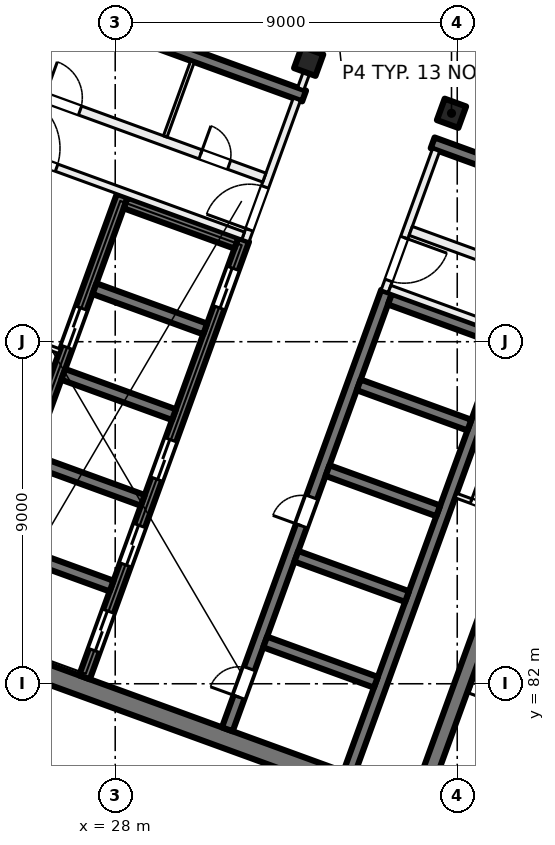
"""IFC4 building model, lengths in metres.
Left out: names, types, materials, properties, quantities, classifications, styles, units other than length and angle.
Written with IfcOpenShell. Run it as: python <this file> out.ifc"""

import sys

from ifc_helpers import new_model, si_unit, direction, frame, frame_2d, origin, origin_2d, place, context, subcontext, project, spatial, rectangle, extrude, element, fill, save


model = new_model("IFC4")
c1 = context("Model", 3, precision=1e-05, world=origin(), true_north=direction((0.0, 1.0)))
c2 = subcontext(c1, "Body", "Model", "MODEL_VIEW")
j1 = project(units=[si_unit("LENGTHUNIT", "METRE"), si_unit("PLANEANGLEUNIT", "RADIAN")], contexts=[c1])
p1 = place(None, origin())
s1 = spatial("IfcSite", under=j1, at=p1, CompositionType="ELEMENT")
p2 = place(p1, origin())
s2 = spatial("IfcBuilding", under=s1, at=p2, CompositionType="ELEMENT")
p3 = place(p2, frame((0.0, 0.0, 208.0)))
s3 = spatial("IfcBuildingStorey", under=s2, at=p3, CompositionType="ELEMENT", Elevation=208.0)
for number, where, z_axis, x_axis in (
    (1, (36.849, 97.011, 0.0), (0.0, 0.0, 1.0), (-0.342, -0.94, 0.0)),
    (2, (33.091, 98.379, 0.0), (0.0, 0.0, 1.0), (-0.342, -0.94, 0.0)),
):
    element("IfcColumn", number, at=place(p3, frame(where, z_axis=z_axis, x_axis=x_axis)), inside=s3, PredefinedType="COLUMN", context=c2, shape_type="SweptSolid", body=[
        extrude(rectangle(XDim=0.6, YDim=0.6, at=origin_2d()), origin(), (0.0, 0.0, 1.0), 4.0),
    ])
p4 = place(p3, frame((35.75, 78.788, 0.0), z_axis=(0.0, 0.0, 1.0), x_axis=(-0.939692894512, 0.342019391267, 0.0)))
e3 = element("IfcWall", 3, at=p4, inside=s3, PredefinedType="SHEAR", context=c2, shape_type="SweptSolid", body=[
    extrude(rectangle(XDim=14.4, YDim=0.5, at=frame_2d((7.2, 0.0))), origin(), (0.0, 0.0, 1.0), 4.0),
])
p5 = place(p3, frame((36.058, 79.048, 0.0), z_axis=(0.0, 0.0, 1.0), x_axis=(0.342016982193, 0.939693771338, 0.0)))
e4 = element("IfcWall", 4, at=p5, inside=s3, PredefinedType="SHEAR", context=c2, shape_type="SweptSolid", body=[
    extrude(rectangle(XDim=7.8, YDim=0.4, at=frame_2d((3.9, 0.0))), origin(), (0.0, 0.0, 1.0), 4.0),
])
p6 = place(p3, frame((30.949, 80.801, 0.0), z_axis=(0.0, 0.0, 1.0), x_axis=(0.342016684409, 0.939693879721, 0.0)))
e5 = element("IfcWall", 5, at=p6, inside=s3, PredefinedType="SHEAR", context=c2, shape_type="SweptSolid", body=[
    extrude(rectangle(XDim=12.25, YDim=0.3, at=frame_2d((6.125, 0.0))), origin(), (0.0, 0.0, 1.0), 4.0),
])
p7 = place(p6, frame((0.9, 0.0, 0.0)))
e6 = element("IfcOpeningElement", 6, at=p7, cuts=e5, PredefinedType="OPENING", context=c2, shape_type="SweptSolid", body=[
    extrude(rectangle(XDim=0.8, YDim=2.1, at=frame_2d((0.4, 1.05))), frame((0.0, 0.16, 0.0), z_axis=(0.0, -1.0, 0.0), x_axis=(1.0, 0.0, 0.0)), (0.0, 0.0, 1.0), 0.32),
])
p8 = place(p6, frame((5.7, 0.0, 0.0)))
e7 = element("IfcOpeningElement", 7, at=p8, cuts=e5, PredefinedType="OPENING", context=c2, shape_type="SweptSolid", body=[
    extrude(rectangle(XDim=0.8, YDim=2.1, at=frame_2d((0.4, 1.05))), frame((0.0, 0.16, 0.0), z_axis=(0.0, -1.0, 0.0), x_axis=(1.0, 0.0, 0.0)), (0.0, 0.0, 1.0), 0.32),
])
p9 = place(p3, frame((34.144, 79.638, 0.0), z_axis=(0.0, 0.0, 1.0), x_axis=(0.342016684409, 0.939693879721, 0.0)))
e8 = element("IfcWall", 8, at=p9, inside=s3, PredefinedType="SHEAR", context=c2, shape_type="SweptSolid", body=[
    extrude(rectangle(XDim=12.25, YDim=0.3, at=frame_2d((6.125, 0.0))), origin(), (0.0, 0.0, 1.0), 4.0),
])
p10 = place(p3, frame((34.858, 82.039, 0.0), z_axis=(0.0, 0.0, 1.0), x_axis=(-0.939689908313, 0.342027595692, 0.0)))
e9 = element("IfcWall", 9, at=p10, inside=s3, PredefinedType="SHEAR", context=c2, shape_type="SweptSolid", body=[
    extrude(rectangle(XDim=3.1, YDim=0.3, at=frame_2d((1.55, 0.0))), origin(), (0.0, 0.0, 1.0), 4.0),
])
p11 = place(p3, frame((35.679, 84.294, 0.0), z_axis=(0.0, 0.0, 1.0), x_axis=(-0.939706007505, 0.341983361377, 0.0)))
e10 = element("IfcWall", 10, at=p11, inside=s3, PredefinedType="SHEAR", context=c2, shape_type="SweptSolid", body=[
    extrude(rectangle(XDim=3.1, YDim=0.3, at=frame_2d((1.55, 0.0))), origin(), (0.0, 0.0, 1.0), 4.0),
])
for number, where, z_axis, x_axis in (
    (11, (36.5, 86.549, 0.0), (0.0, 0.0, 1.0), (-0.94, 0.342, 0.0)),
    (12, (37.321, 88.805, 0.0), (0.0, 0.0, 1.0), (-0.94, 0.342, 0.0)),
    (13, (38.142, 91.06, 0.0), (0.0, 0.0, 1.0), (-0.94, 0.342, 0.0)),
):
    element("IfcWall", number, at=place(p3, frame(where, z_axis=z_axis, x_axis=x_axis)), inside=s3, PredefinedType="SHEAR", context=c2, shape_type="SweptSolid", body=[
        extrude(rectangle(XDim=3.1, YDim=0.3, at=frame_2d((1.55, 0.0))), origin(), (0.0, 0.0, 1.0), 4.0),
    ])
p12 = place(p3, frame((27.191, 82.169, 0.0), z_axis=(0.0, 0.0, 1.0), x_axis=(0.342016684409, 0.939693879721, 0.0)))
e14 = element("IfcWall", 14, at=p12, inside=s3, PredefinedType="SHEAR", context=c2, shape_type="SweptSolid", body=[
    extrude(rectangle(XDim=12.25, YDim=0.3, at=frame_2d((6.125, 0.0))), origin(), (0.0, 0.0, 1.0), 4.0),
])
p13 = place(p12, frame((0.75, 0.0, 0.0)))
e15 = element("IfcOpeningElement", 15, at=p13, cuts=e14, PredefinedType="OPENING", context=c2, shape_type="SweptSolid", body=[
    extrude(rectangle(XDim=1.1, YDim=2.1, at=frame_2d((0.55, 1.05))), frame((0.0, 0.16, 0.0), z_axis=(0.0, -1.0, 0.0), x_axis=(1.0, 0.0, 0.0)), (0.0, 0.0, 1.0), 0.32),
])
p14 = place(p12, frame((3.15, 0.0, 0.0)))
e16 = element("IfcOpeningElement", 16, at=p14, cuts=e14, PredefinedType="OPENING", context=c2, shape_type="SweptSolid", body=[
    extrude(rectangle(XDim=1.1, YDim=2.1, at=frame_2d((0.55, 1.05))), frame((0.0, 0.16, 0.0), z_axis=(0.0, -1.0, 0.0), x_axis=(1.0, 0.0, 0.0)), (0.0, 0.0, 1.0), 0.32),
])
p15 = place(p12, frame((5.55, 0.0, 0.0)))
e17 = element("IfcOpeningElement", 17, at=p15, cuts=e14, PredefinedType="OPENING", context=c2, shape_type="SweptSolid", body=[
    extrude(rectangle(XDim=1.1, YDim=2.1, at=frame_2d((0.55, 1.05))), frame((0.0, 0.16, 0.0), z_axis=(0.0, -1.0, 0.0), x_axis=(1.0, 0.0, 0.0)), (0.0, 0.0, 1.0), 0.32),
])
p16 = place(p12, frame((10.35, 0.0, 0.0)))
e18 = element("IfcOpeningElement", 18, at=p16, cuts=e14, PredefinedType="OPENING", context=c2, shape_type="SweptSolid", body=[
    extrude(rectangle(XDim=1.1, YDim=2.1, at=frame_2d((0.55, 1.05))), frame((0.0, 0.16, 0.0), z_axis=(0.0, -1.0, 0.0), x_axis=(1.0, 0.0, 0.0)), (0.0, 0.0, 1.0), 0.32),
])
p17 = place(p3, frame((23.996, 83.332, 0.0), z_axis=(0.0, 0.0, 1.0), x_axis=(0.342016684409, 0.939693879721, 0.0)))
e19 = element("IfcWall", 19, at=p17, inside=s3, PredefinedType="SHEAR", context=c2, shape_type="SweptSolid", body=[
    extrude(rectangle(XDim=12.25, YDim=0.3, at=frame_2d((6.125, 0.0))), origin(), (0.0, 0.0, 1.0), 4.0),
])
p18 = place(p17, frame((8.0, 0.0, 0.0)))
e20 = element("IfcOpeningElement", 20, at=p18, cuts=e19, PredefinedType="OPENING", context=c2, shape_type="SweptSolid", body=[
    extrude(rectangle(XDim=1.1, YDim=2.1, at=frame_2d((0.55, 1.05))), frame((0.0, 0.16, 0.0), z_axis=(0.0, -1.0, 0.0), x_axis=(1.0, 0.0, 0.0)), (0.0, 0.0, 1.0), 0.32),
])
for number, where, z_axis, x_axis in (
    (21, (27.905, 84.57, 0.0), (0.0, 0.0, 1.0), (-0.94, 0.342, 0.0)),
    (22, (28.726, 86.825, 0.0), (0.0, 0.0, 1.0), (-0.94, 0.342, 0.0)),
    (23, (29.546, 89.08, 0.0), (0.0, 0.0, 1.0), (-0.94, 0.342, 0.0)),
):
    element("IfcWall", number, at=place(p3, frame(where, z_axis=z_axis, x_axis=x_axis)), inside=s3, PredefinedType="SHEAR", context=c2, shape_type="SweptSolid", body=[
        extrude(rectangle(XDim=3.1, YDim=0.3, at=frame_2d((1.55, 0.0))), origin(), (0.0, 0.0, 1.0), 4.0),
    ])
for number, where, z_axis, x_axis in (
    (24, (30.367, 91.336, 0.0), (0.0, 0.0, 1.0), (-0.94, 0.342, 0.0)),
    (25, (31.188, 93.591, 0.0), (0.0, 0.0, 1.0), (-0.94, 0.342, 0.0)),
):
    element("IfcWall", number, at=place(p3, frame(where, z_axis=z_axis, x_axis=x_axis)), inside=s3, PredefinedType="SHEAR", context=c2, shape_type="SweptSolid", body=[
        extrude(rectangle(XDim=3.1, YDim=0.3, at=frame_2d((1.55, 0.0))), origin(), (0.0, 0.0, 1.0), 4.0),
    ])
p19 = place(p3, frame((44.529, 93.258, 0.0), z_axis=(0.0, 0.0, 1.0), x_axis=(-0.9396917844, 0.342022441267, 0.0)))
e26 = element("IfcWall", 26, at=p19, inside=s3, PredefinedType="SHEAR", context=c2, shape_type="SweptSolid", body=[
    extrude(rectangle(XDim=8.7, YDim=0.3, at=frame_2d((4.35, 0.0))), origin(), (0.0, 0.0, 1.0), 4.0),
])
p20 = place(p3, frame((32.971, 97.465, 0.0), z_axis=(0.0, 0.0, 1.0), x_axis=(-0.939695066972, 0.34201342241, 0.0)))
e27 = element("IfcWall", 27, at=p20, inside=s3, PredefinedType="SHEAR", context=c2, shape_type="SweptSolid", body=[
    extrude(rectangle(XDim=8.7, YDim=0.3, at=frame_2d((4.35, 0.0))), origin(), (0.0, 0.0, 1.0), 4.0),
])
p21 = place(p3, frame((31.427, 93.663, 0.0), z_axis=(0.0, 0.0, 1.0), x_axis=(0.342030870568, 0.93968871632, 0.0)))
e28 = element("IfcWall", 28, at=p21, inside=s3, PredefinedType="PARTITIONING", context=c2, shape_type="SweptSolid", body=[
    extrude(rectangle(XDim=3.95, YDim=0.2, at=frame_2d((1.975, 0.0))), origin(), (0.0, 0.0, 1.0), 3.625),
])
p22 = place(p21, frame((0.3, 0.0, 0.0)))
e29 = element("IfcOpeningElement", 29, at=p22, cuts=e28, PredefinedType="OPENING", context=c2, shape_type="SweptSolid", body=[
    extrude(rectangle(XDim=1.2, YDim=2.1, at=frame_2d((0.6, 1.05))), frame((0.0, 0.11, 0.0), z_axis=(0.0, -1.0, 0.0), x_axis=(1.0, 0.0, 0.0)), (0.0, 0.0, 1.0), 0.22),
])
p23 = place(p3, frame((23.427, 96.682, 0.0), z_axis=(0.0, 0.0, 1.0), x_axis=(0.939690465531, -0.342026064782, 0.0)))
e30 = element("IfcWall", 30, at=p23, inside=s3, PredefinedType="PARTITIONING", context=c2, shape_type="SweptSolid", body=[
    extrude(rectangle(XDim=8.45, YDim=0.2, at=frame_2d((4.225, 0.0))), origin(), (0.0, 0.0, 1.0), 3.625),
])
p24 = place(p23, frame((1.725, 0.0, 0.0)))
e31 = element("IfcOpeningElement", 31, at=p24, cuts=e30, PredefinedType="OPENING", context=c2, shape_type="SweptSolid", body=[
    extrude(rectangle(XDim=1.5, YDim=2.1, at=frame_2d((0.75, 1.05))), frame((0.0, 0.11, 0.0), z_axis=(0.0, -1.0, 0.0), x_axis=(1.0, 0.0, 0.0)), (0.0, 0.0, 1.0), 0.22),
])
p25 = place(p3, frame((23.983, 98.208, 0.0), z_axis=(0.0, 0.0, 1.0), x_axis=(0.939699751196, -0.342000552051, 0.0)))
e32 = element("IfcWall", 32, at=p25, inside=s3, PredefinedType="PARTITIONING", context=c2, shape_type="SweptSolid", body=[
    extrude(rectangle(XDim=8.45, YDim=0.25, at=frame_2d((4.225, 0.0))), origin(), (0.0, 0.0, 1.0), 3.625),
])
p26 = place(p25, frame((6.665, 0.0, 0.0)))
e33 = element("IfcOpeningElement", 33, at=p26, cuts=e32, PredefinedType="OPENING", context=c2, shape_type="SweptSolid", body=[
    extrude(rectangle(XDim=0.8, YDim=2.1, at=frame_2d((0.4, 1.05))), frame((0.0, 0.135, 0.0), z_axis=(0.0, -1.0, 0.0), x_axis=(1.0, 0.0, 0.0)), (0.0, 0.0, 1.0), 0.27),
])
p27 = place(p25, frame((2.29, 0.0, 0.0)))
e34 = element("IfcOpeningElement", 34, at=p27, cuts=e32, PredefinedType="OPENING", context=c2, shape_type="SweptSolid", body=[
    extrude(rectangle(XDim=1.0, YDim=2.1, at=frame_2d((0.5, 1.05))), frame((0.0, 0.135, 0.0), z_axis=(0.0, -1.0, 0.0), x_axis=(1.0, 0.0, 0.0)), (0.0, 0.0, 1.0), 0.27),
])
p28 = place(p3, frame((24.985, 91.312, 0.0), z_axis=(0.0, 0.0, 1.0), x_axis=(0.939719959755, -0.341945020783, 0.0)))
e35 = element("IfcWall", 35, at=p28, inside=s3, PredefinedType="PARTITIONING", context=c2, shape_type="SweptSolid", body=[
    extrude(rectangle(XDim=1.65, YDim=0.125, at=frame_2d((0.825, 0.0))), origin(), (0.0, 0.0, 1.0), 3.625),
])
p29 = place(p28, frame((0.425, 0.0, 0.0)))
e36 = element("IfcOpeningElement", 36, at=p29, cuts=e35, PredefinedType="OPENING", context=c2, shape_type="SweptSolid", body=[
    extrude(rectangle(XDim=0.8, YDim=2.1, at=frame_2d((0.4, 1.05))), frame((0.0, 0.073, 0.0), z_axis=(0.0, -1.0, 0.0), x_axis=(1.0, 0.0, 0.0)), (0.0, 0.0, 1.0), 0.145),
])
p30 = place(p3, frame((29.316, 96.4, 0.0), z_axis=(0.0, 0.0, 1.0), x_axis=(0.342023078919, 0.939691552312, 0.0)))
e37 = element("IfcWall", 37, at=p30, inside=s3, PredefinedType="PARTITIONING", context=c2, shape_type="SweptSolid", body=[
    extrude(rectangle(XDim=2.1, YDim=0.1, at=frame_2d((1.05, 0.0))), origin(), (0.0, 0.0, 1.0), 3.625),
])
p31 = place(p3, frame((36.443, 96.041, 0.0), z_axis=(0.0, 0.0, 1.0), x_axis=(-0.341996156931, -0.939701350773, 0.0)))
e38 = element("IfcWall", 38, at=p31, inside=s3, PredefinedType="PARTITIONING", context=c2, shape_type="SweptSolid", body=[
    extrude(rectangle(XDim=3.95, YDim=0.2, at=frame_2d((1.975, 0.0))), origin(), (0.0, 0.0, 1.0), 3.625),
])
p32 = place(p31, frame((2.45, 0.0, 0.0)))
e39 = element("IfcOpeningElement", 39, at=p32, cuts=e38, PredefinedType="OPENING", context=c2, shape_type="SweptSolid", body=[
    extrude(rectangle(XDim=1.2, YDim=2.1, at=frame_2d((0.6, 1.05))), frame((0.0, 0.11, 0.0), z_axis=(0.0, -1.0, 0.0), x_axis=(1.0, 0.0, 0.0)), (0.0, 0.0, 1.0), 0.22),
])
p33 = place(p3, frame((35.22, 92.389, 0.0), z_axis=(0.0, 0.0, 1.0), x_axis=(0.939690465531, -0.342026064782, 0.0)))
e40 = element("IfcWall", 40, at=p33, inside=s3, PredefinedType="PARTITIONING", context=c2, shape_type="SweptSolid", body=[
    extrude(rectangle(XDim=8.45, YDim=0.2, at=frame_2d((4.225, 0.0))), origin(), (0.0, 0.0, 1.0), 3.625),
])
p34 = place(p33, frame((5.225, 0.0, 0.0)))
e41 = element("IfcOpeningElement", 41, at=p34, cuts=e40, PredefinedType="OPENING", context=c2, shape_type="SweptSolid", body=[
    extrude(rectangle(XDim=1.5, YDim=2.1, at=frame_2d((0.75, 1.05))), frame((0.0, 0.11, 0.0), z_axis=(0.0, -1.0, 0.0), x_axis=(1.0, 0.0, 0.0)), (0.0, 0.0, 1.0), 0.22),
])
p35 = place(p3, frame((35.776, 93.916, 0.0), z_axis=(0.0, 0.0, 1.0), x_axis=(0.939690465531, -0.342026064782, 0.0)))
e42 = element("IfcWall", 42, at=p35, inside=s3, PredefinedType="PARTITIONING", context=c2, shape_type="SweptSolid", body=[
    extrude(rectangle(XDim=8.45, YDim=0.25, at=frame_2d((4.225, 0.0))), origin(), (0.0, 0.0, 1.0), 3.625),
])
p36 = place(p35, frame((3.825, 0.0, 0.0)))
e43 = element("IfcOpeningElement", 43, at=p36, cuts=e42, PredefinedType="OPENING", context=c2, shape_type="SweptSolid", body=[
    extrude(rectangle(XDim=0.8, YDim=2.1, at=frame_2d((0.4, 1.05))), frame((0.0, 0.135, 0.0), z_axis=(0.0, -1.0, 0.0), x_axis=(1.0, 0.0, 0.0)), (0.0, 0.0, 1.0), 0.27),
])
p37 = place(p3, frame((36.966, 86.952, 0.0), z_axis=(0.0, 0.0, 1.0), x_axis=(0.939672407396, -0.342075674051, 0.0)))
e44 = element("IfcWall", 44, at=p37, inside=s3, PredefinedType="PARTITIONING", context=c2, shape_type="SweptSolid", body=[
    extrude(rectangle(XDim=1.65, YDim=0.125, at=frame_2d((0.825, 0.0))), origin(), (0.0, 0.0, 1.0), 3.625),
])
p38 = place(p37, frame((0.425, 0.0, 0.0)))
e45 = element("IfcOpeningElement", 45, at=p38, cuts=e44, PredefinedType="OPENING", context=c2, shape_type="SweptSolid", body=[
    extrude(rectangle(XDim=0.8, YDim=2.1, at=frame_2d((0.4, 1.05))), frame((0.0, 0.073, 0.0), z_axis=(0.0, -1.0, 0.0), x_axis=(1.0, 0.0, 0.0)), (0.0, 0.0, 1.0), 0.145),
])
p39 = place(p3, frame((32.881, 97.657, 0.0), z_axis=(0.0, 0.0, 1.0), x_axis=(0.342058204353, 0.939678766832, 0.0)))
e46 = element("IfcWall", 46, at=p39, inside=s3, PredefinedType="PARTITIONING", context=c2, shape_type="SweptSolid", body=[
    extrude(rectangle(XDim=5.163, YDim=0.175, at=frame_2d((2.581, 0.0))), origin(), (0.0, 0.0, 1.0), 3.625),
])
p40 = place(p39, frame((1.991, 0.0, 0.0)))
e47 = element("IfcOpeningElement", 47, at=p40, cuts=e46, PredefinedType="OPENING", context=c2, shape_type="SweptSolid", body=[
    extrude(rectangle(XDim=1.2, YDim=2.1, at=frame_2d((0.6, 1.05))), frame((0.0, 0.097, 0.0), z_axis=(0.0, -1.0, 0.0), x_axis=(1.0, 0.0, 0.0)), (0.0, 0.0, 1.0), 0.195),
])
p41 = place(p13, origin())
e48 = element("IfcDoor", 48, at=p41, inside=s3, OperationType="DOUBLE_DOOR_SLIDING", PredefinedType="DOOR", context=c2, shape_type="SweptSolid", body=[
    extrude(rectangle(XDim=1.1, YDim=2.1, at=frame_2d((0.55, 1.05))), frame((0.0, 0.025, 0.0), z_axis=(0.0, -1.0, 0.0), x_axis=(1.0, 0.0, 0.0)), (0.0, 0.0, 1.0), 0.05),
])
fill(e15, e48)
p42 = place(p14, origin())
e49 = element("IfcDoor", 49, at=p42, inside=s3, OperationType="DOUBLE_DOOR_SLIDING", PredefinedType="DOOR", context=c2, shape_type="SweptSolid", body=[
    extrude(rectangle(XDim=1.1, YDim=2.1, at=frame_2d((0.55, 1.05))), frame((0.0, 0.025, 0.0), z_axis=(0.0, -1.0, 0.0), x_axis=(1.0, 0.0, 0.0)), (0.0, 0.0, 1.0), 0.05),
])
fill(e16, e49)
p43 = place(p15, origin())
e50 = element("IfcDoor", 50, at=p43, inside=s3, OperationType="DOUBLE_DOOR_SLIDING", PredefinedType="DOOR", context=c2, shape_type="SweptSolid", body=[
    extrude(rectangle(XDim=1.1, YDim=2.1, at=frame_2d((0.55, 1.05))), frame((0.0, 0.025, 0.0), z_axis=(0.0, -1.0, 0.0), x_axis=(1.0, 0.0, 0.0)), (0.0, 0.0, 1.0), 0.05),
])
fill(e17, e50)
p44 = place(p16, origin())
e51 = element("IfcDoor", 51, at=p44, inside=s3, OperationType="DOUBLE_DOOR_SLIDING", PredefinedType="DOOR", context=c2, shape_type="SweptSolid", body=[
    extrude(rectangle(XDim=1.1, YDim=2.1, at=frame_2d((0.55, 1.05))), frame((0.0, 0.025, 0.0), z_axis=(0.0, -1.0, 0.0), x_axis=(1.0, 0.0, 0.0)), (0.0, 0.0, 1.0), 0.05),
])
fill(e18, e51)
p45 = place(p7, origin())
e52 = element("IfcDoor", 52, at=p45, inside=s3, OperationType="SINGLE_SWING_LEFT", PredefinedType="DOOR", context=c2, shape_type="SweptSolid", body=[
    extrude(rectangle(XDim=0.8, YDim=2.1, at=frame_2d((0.4, 1.05))), frame((0.0, 0.025, 0.0), z_axis=(0.0, -1.0, 0.0), x_axis=(1.0, 0.0, 0.0)), (0.0, 0.0, 1.0), 0.05),
])
fill(e6, e52)
p46 = place(p8, origin())
e53 = element("IfcDoor", 53, at=p46, inside=s3, OperationType="SINGLE_SWING_RIGHT", PredefinedType="DOOR", context=c2, shape_type="SweptSolid", body=[
    extrude(rectangle(XDim=0.8, YDim=2.1, at=frame_2d((0.4, 1.05))), frame((0.0, 0.025, 0.0), z_axis=(0.0, -1.0, 0.0), x_axis=(1.0, 0.0, 0.0)), (0.0, 0.0, 1.0), 0.05),
])
fill(e7, e53)
p47 = place(p22, origin())
e54 = element("IfcDoor", 54, at=p47, inside=s3, OperationType="DOUBLE_DOOR_SINGLE_SWING", PredefinedType="DOOR", context=c2, shape_type="SweptSolid", body=[
    extrude(rectangle(XDim=1.2, YDim=2.1, at=frame_2d((0.6, 1.05))), frame((0.0, 0.025, 0.0), z_axis=(0.0, -1.0, 0.0), x_axis=(1.0, 0.0, 0.0)), (0.0, 0.0, 1.0), 0.05),
])
fill(e29, e54)
p48 = place(p24, origin())
e55 = element("IfcDoor", 55, at=p48, inside=s3, OperationType="DOUBLE_DOOR_SINGLE_SWING", PredefinedType="DOOR", context=c2, shape_type="SweptSolid", body=[
    extrude(rectangle(XDim=1.5, YDim=2.1, at=frame_2d((0.75, 1.05))), frame((0.0, 0.025, 0.0), z_axis=(0.0, -1.0, 0.0), x_axis=(1.0, 0.0, 0.0)), (0.0, 0.0, 1.0), 0.05),
])
fill(e31, e55)
p49 = place(p26, origin())
e56 = element("IfcDoor", 56, at=p49, inside=s3, OperationType="SINGLE_SWING_LEFT", PredefinedType="DOOR", context=c2, shape_type="SweptSolid", body=[
    extrude(rectangle(XDim=0.8, YDim=2.1, at=frame_2d((0.4, 1.05))), frame((0.0, 0.025, 0.0), z_axis=(0.0, -1.0, 0.0), x_axis=(1.0, 0.0, 0.0)), (0.0, 0.0, 1.0), 0.05),
])
fill(e33, e56)
p50 = place(p27, origin())
e57 = element("IfcDoor", 57, at=p50, inside=s3, OperationType="SINGLE_SWING_RIGHT", PredefinedType="DOOR", context=c2, shape_type="SweptSolid", body=[
    extrude(rectangle(XDim=1.0, YDim=2.1, at=frame_2d((0.5, 1.05))), frame((0.0, 0.025, 0.0), z_axis=(0.0, -1.0, 0.0), x_axis=(1.0, 0.0, 0.0)), (0.0, 0.0, 1.0), 0.05),
])
fill(e34, e57)
p51 = place(p32, origin())
e58 = element("IfcDoor", 58, at=p51, inside=s3, OperationType="DOUBLE_DOOR_SINGLE_SWING", PredefinedType="DOOR", context=c2, shape_type="SweptSolid", body=[
    extrude(rectangle(XDim=1.2, YDim=2.1, at=frame_2d((0.6, 1.05))), frame((0.0, 0.025, 0.0), z_axis=(0.0, -1.0, 0.0), x_axis=(1.0, 0.0, 0.0)), (0.0, 0.0, 1.0), 0.05),
])
fill(e39, e58)
p52 = place(p38, origin())
e59 = element("IfcDoor", 59, at=p52, inside=s3, OperationType="SINGLE_SWING_LEFT", PredefinedType="DOOR", context=c2, shape_type="SweptSolid", body=[
    extrude(rectangle(XDim=0.8, YDim=2.1, at=frame_2d((0.4, 1.05))), frame((0.0, 0.025, 0.0), z_axis=(0.0, -1.0, 0.0), x_axis=(1.0, 0.0, 0.0)), (0.0, 0.0, 1.0), 0.05),
])
fill(e45, e59)
p53 = place(p18, origin())
e60 = element("IfcDoor", 60, at=p53, inside=s3, OperationType="DOUBLE_DOOR_SLIDING", PredefinedType="DOOR", context=c2, shape_type="SweptSolid", body=[
    extrude(rectangle(XDim=1.1, YDim=2.1, at=frame_2d((0.55, 1.05))), frame((0.0, 0.025, 0.0), z_axis=(0.0, -1.0, 0.0), x_axis=(1.0, 0.0, 0.0)), (0.0, 0.0, 1.0), 0.05),
])
fill(e20, e60)
save(model, sys.argv[1])
